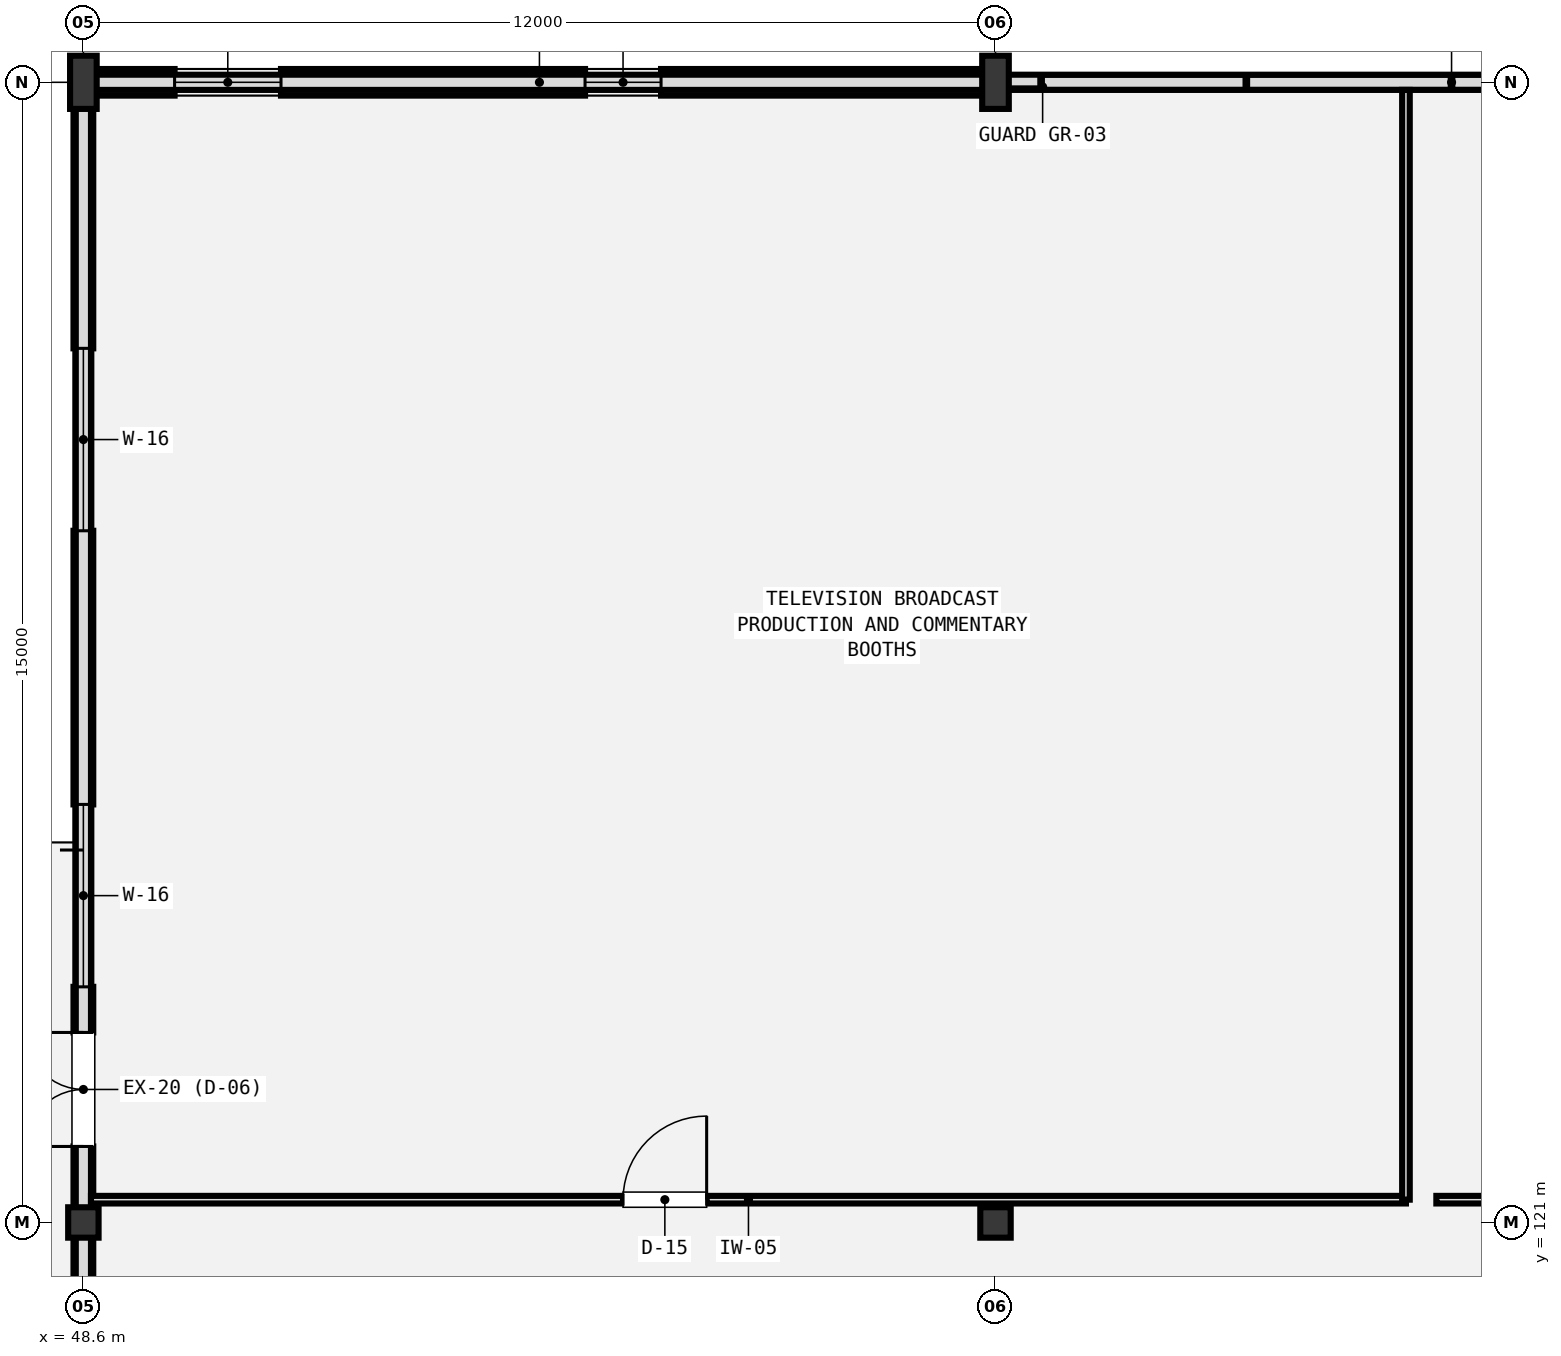
"""IFC4 building model, lengths in metres.
Left out: names, types, materials, properties, quantities, classifications, styles, units other than length and angle.
Written with IfcOpenShell. Run it as: python <this file> out.ifc"""

import sys

from ifc_helpers import new_model, si_unit, direction, frame, frame_2d, origin, origin_2d, place, context, subcontext, project, spatial, rectangle, extrude, element, fill, save


model = new_model("IFC4")
c1 = context("Model", 3, precision=1e-05, world=origin(), true_north=direction((0.0, 1.0)))
c2 = subcontext(c1, "Body", "Model", "MODEL_VIEW")
j1 = project(units=[si_unit("LENGTHUNIT", "METRE"), si_unit("PLANEANGLEUNIT", "RADIAN")], contexts=[c1])
p1 = place(None, origin())
s1 = spatial("IfcSite", under=j1, at=p1, CompositionType="ELEMENT")
p2 = place(p1, origin())
s2 = spatial("IfcBuilding", under=s1, at=p2, CompositionType="ELEMENT")
p3 = place(p2, frame((0.0, 0.0, 18.6)))
s3 = spatial("IfcBuildingStorey", under=s2, at=p3, CompositionType="ELEMENT", Elevation=18.6)
p4 = place(p3, frame((48.6, 121.0, 0.0), z_axis=(0.0, 0.0, 1.0), x_axis=(1.0, 0.0, 0.0)))
e1 = element("IfcColumn", 1, at=p4, inside=s3, PredefinedType="COLUMN", context=c2, shape_type="SweptSolid", body=[
    extrude(rectangle(XDim=0.4, YDim=0.4, at=origin_2d()), origin(), (0.0, 0.0, 1.0), 3.88),
])
p5 = place(p3, frame((48.6, 136.0, 0.0), z_axis=(0.0, 0.0, 1.0), x_axis=(1.0, 0.0, 0.0)))
e2 = element("IfcColumn", 2, at=p5, inside=s3, PredefinedType="COLUMN", context=c2, shape_type="SweptSolid", body=[
    extrude(rectangle(XDim=0.35, YDim=0.7, at=origin_2d()), origin(), (0.0, 0.0, 1.0), 3.88),
])
p6 = place(p3, frame((60.6, 121.0, 0.0), z_axis=(0.0, 0.0, 1.0), x_axis=(1.0, 0.0, 0.0)))
e3 = element("IfcColumn", 3, at=p6, inside=s3, PredefinedType="COLUMN", context=c2, shape_type="SweptSolid", body=[
    extrude(rectangle(XDim=0.4, YDim=0.4, at=origin_2d()), origin(), (0.0, 0.0, 1.0), 3.88),
])
p7 = place(p3, frame((60.6, 136.0, 0.0), z_axis=(0.0, 0.0, 1.0), x_axis=(1.0, 0.0, 0.0)))
e4 = element("IfcColumn", 4, at=p7, inside=s3, PredefinedType="COLUMN", context=c2, shape_type="SweptSolid", body=[
    extrude(rectangle(XDim=0.35, YDim=0.7, at=origin_2d()), origin(), (0.0, 0.0, 1.0), 3.88),
])
p8 = place(p3, frame((48.6, 136.0, 0.0), z_axis=(0.0, 0.0, 1.0), x_axis=(1.0, 0.0, 0.0)))
e5 = element("IfcWall", 5, at=p8, inside=s3, PredefinedType="SOLIDWALL", context=c2, shape_type="SweptSolid", body=[
    extrude(rectangle(XDim=12.0, YDim=0.35, at=frame_2d((6.0, 0.0))), origin(), (0.0, 0.0, 1.0), 3.43),
])
p9 = place(p8, frame((1.2, 0.0, 0.95)))
e6 = element("IfcOpeningElement", 6, at=p9, cuts=e5, PredefinedType="OPENING", context=c2, shape_type="SweptSolid", body=[
    extrude(rectangle(XDim=1.4, YDim=0.75, at=frame_2d((0.7, 0.375))), frame((0.0, 0.185, 0.0), z_axis=(0.0, -1.0, 0.0), x_axis=(1.0, 0.0, 0.0)), (0.0, 0.0, 1.0), 0.37),
])
p10 = place(p8, frame((6.6, 0.0, 0.95)))
e7 = element("IfcOpeningElement", 7, at=p10, cuts=e5, PredefinedType="OPENING", context=c2, shape_type="SweptSolid", body=[
    extrude(rectangle(XDim=1.0, YDim=0.75, at=frame_2d((0.5, 0.375))), frame((0.0, 0.185, 0.0), z_axis=(0.0, -1.0, 0.0), x_axis=(1.0, 0.0, 0.0)), (0.0, 0.0, 1.0), 0.37),
])
p11 = place(p3, frame((48.6, 108.6, 0.0), z_axis=(0.0, 0.0, 1.0), x_axis=(0.0, 1.0, 0.0)))
e8 = element("IfcWall", 8, at=p11, inside=s3, PredefinedType="SOLIDWALL", context=c2, shape_type="SweptSolid", body=[
    extrude(rectangle(XDim=27.4, YDim=0.26, at=frame_2d((13.7, 0.0))), origin(), (0.0, 0.0, 1.0), 3.43),
])
p12 = place(p11, frame((13.4, 0.0, 0.0)))
e9 = element("IfcOpeningElement", 9, at=p12, cuts=e8, PredefinedType="OPENING", context=c2, shape_type="SweptSolid", body=[
    extrude(rectangle(XDim=1.5, YDim=2.2, at=frame_2d((0.75, 1.1))), frame((0.0, 0.14, 0.0), z_axis=(0.0, -1.0, 0.0), x_axis=(1.0, 0.0, 0.0)), (0.0, 0.0, 1.0), 0.28),
])
p13 = place(p11, frame((15.5, 0.0, 0.85)))
e10 = element("IfcOpeningElement", 10, at=p13, cuts=e8, PredefinedType="OPENING", context=c2, shape_type="SweptSolid", body=[
    extrude(rectangle(XDim=2.4, YDim=1.5, at=frame_2d((1.2, 0.75))), frame((0.0, 0.14, 0.0), z_axis=(0.0, -1.0, 0.0), x_axis=(1.0, 0.0, 0.0)), (0.0, 0.0, 1.0), 0.28),
])
p14 = place(p11, frame((21.5, 0.0, 0.85)))
e11 = element("IfcOpeningElement", 11, at=p14, cuts=e8, PredefinedType="OPENING", context=c2, shape_type="SweptSolid", body=[
    extrude(rectangle(XDim=2.4, YDim=1.5, at=frame_2d((1.2, 0.75))), frame((0.0, 0.14, 0.0), z_axis=(0.0, -1.0, 0.0), x_axis=(1.0, 0.0, 0.0)), (0.0, 0.0, 1.0), 0.28),
])
p15 = place(p3, frame((48.6, 136.0, 4.2), z_axis=(0.0, 0.0, 1.0), x_axis=(1.0, 0.0, 0.0)))
e12 = element("IfcWall", 12, at=p15, inside=s3, PredefinedType="PARAPET", context=c2, shape_type="SweptSolid", body=[
    extrude(rectangle(XDim=48.0, YDim=0.2, at=frame_2d((24.0, 0.0))), origin(), (0.0, 0.0, 1.0), 1.15),
])
p16 = place(p3, frame((48.6, 108.6, 4.2), z_axis=(0.0, 0.0, 1.0), x_axis=(0.0, 1.0, 0.0)))
e13 = element("IfcWall", 13, at=p16, inside=s3, PredefinedType="PARAPET", context=c2, shape_type="SweptSolid", body=[
    extrude(rectangle(XDim=27.4, YDim=0.2, at=frame_2d((13.7, 0.0))), origin(), (0.0, 0.0, 1.0), 1.15),
])
p17 = place(p3, frame((48.7, 121.3, 0.0), z_axis=(0.0, 0.0, 1.0), x_axis=(1.0, 0.0, 0.0)))
e14 = element("IfcWall", 14, at=p17, inside=s3, PredefinedType="PARTITIONING", context=c2, shape_type="SweptSolid", body=[
    extrude(rectangle(XDim=17.3, YDim=0.1, at=frame_2d((8.65, 0.0))), origin(), (0.0, 0.0, 1.0), 3.25),
])
p18 = place(p17, frame((7.0, 0.0, 0.0)))
e15 = element("IfcOpeningElement", 15, at=p18, cuts=e14, PredefinedType="OPENING", context=c2, shape_type="SweptSolid", body=[
    extrude(rectangle(XDim=1.1, YDim=2.2, at=frame_2d((0.55, 1.1))), frame((0.0, 0.06, 0.0), z_axis=(0.0, -1.0, 0.0), x_axis=(1.0, 0.0, 0.0)), (0.0, 0.0, 1.0), 0.12),
])
p19 = place(p3, frame((66.0, 121.3, 0.0), z_axis=(0.0, 0.0, 1.0), x_axis=(0.0, 1.0, 0.0)))
e16 = element("IfcWall", 16, at=p19, inside=s3, PredefinedType="PARTITIONING", context=c2, shape_type="SweptSolid", body=[
    extrude(rectangle(XDim=14.6, YDim=0.1, at=frame_2d((7.3, 0.0))), origin(), (0.0, 0.0, 1.0), 3.25),
])
p20 = place(p3, frame((66.4, 121.3, 0.0), z_axis=(0.0, 0.0, 1.0), x_axis=(1.0, 0.0, 0.0)))
e17 = element("IfcWall", 17, at=p20, inside=s3, PredefinedType="PARTITIONING", context=c2, shape_type="SweptSolid", body=[
    extrude(rectangle(XDim=13.6, YDim=0.1, at=frame_2d((6.8, 0.0))), origin(), (0.0, 0.0, 1.0), 3.25),
])
p21 = place(p20, frame((2.8, 0.0, 0.0)))
e18 = element("IfcOpeningElement", 18, at=p21, cuts=e17, PredefinedType="OPENING", context=c2, shape_type="SweptSolid", body=[
    extrude(rectangle(XDim=1.1, YDim=2.2, at=frame_2d((0.55, 1.1))), frame((0.0, 0.06, 0.0), z_axis=(0.0, -1.0, 0.0), x_axis=(1.0, 0.0, 0.0)), (0.0, 0.0, 1.0), 0.12),
])
p22 = place(p9, origin())
e19 = element("IfcWindow", 19, at=p22, inside=s3, PartitioningType="SINGLE_PANEL", PredefinedType="WINDOW", context=c2, shape_type="SweptSolid", body=[
    extrude(rectangle(XDim=1.4, YDim=0.75, at=frame_2d((0.7, 0.375))), frame((0.0, 0.03, 0.0), z_axis=(0.0, -1.0, 0.0), x_axis=(1.0, 0.0, 0.0)), (0.0, 0.0, 1.0), 0.06),
])
fill(e6, e19)
p23 = place(p10, origin())
e20 = element("IfcWindow", 20, at=p23, inside=s3, PartitioningType="SINGLE_PANEL", PredefinedType="WINDOW", context=c2, shape_type="SweptSolid", body=[
    extrude(rectangle(XDim=1.0, YDim=0.75, at=frame_2d((0.5, 0.375))), frame((0.0, 0.03, 0.0), z_axis=(0.0, -1.0, 0.0), x_axis=(1.0, 0.0, 0.0)), (0.0, 0.0, 1.0), 0.06),
])
fill(e7, e20)
p24 = place(p12, origin())
e21 = element("IfcDoor", 21, at=p24, inside=s3, OperationType="DOUBLE_DOOR_SINGLE_SWING", PredefinedType="DOOR", context=c2, shape_type="SweptSolid", body=[
    extrude(rectangle(XDim=1.5, YDim=2.2, at=frame_2d((0.75, 1.1))), frame((0.0, 0.025, 0.0), z_axis=(0.0, -1.0, 0.0), x_axis=(1.0, 0.0, 0.0)), (0.0, 0.0, 1.0), 0.05),
])
fill(e9, e21)
p25 = place(p13, origin())
e22 = element("IfcWindow", 22, at=p25, inside=s3, PartitioningType="DOUBLE_PANEL_VERTICAL", PredefinedType="WINDOW", context=c2, shape_type="SweptSolid", body=[
    extrude(rectangle(XDim=2.4, YDim=1.5, at=frame_2d((1.2, 0.75))), frame((0.0, 0.03, 0.0), z_axis=(0.0, -1.0, 0.0), x_axis=(1.0, 0.0, 0.0)), (0.0, 0.0, 1.0), 0.06),
])
fill(e10, e22)
p26 = place(p14, origin())
e23 = element("IfcWindow", 23, at=p26, inside=s3, PartitioningType="DOUBLE_PANEL_VERTICAL", PredefinedType="WINDOW", context=c2, shape_type="SweptSolid", body=[
    extrude(rectangle(XDim=2.4, YDim=1.5, at=frame_2d((1.2, 0.75))), frame((0.0, 0.03, 0.0), z_axis=(0.0, -1.0, 0.0), x_axis=(1.0, 0.0, 0.0)), (0.0, 0.0, 1.0), 0.06),
])
fill(e11, e23)
p27 = place(p18, origin())
e24 = element("IfcDoor", 24, at=p27, inside=s3, OperationType="SINGLE_SWING_RIGHT", PredefinedType="DOOR", context=c2, shape_type="SweptSolid", body=[
    extrude(rectangle(XDim=1.1, YDim=2.2, at=frame_2d((0.55, 1.1))), frame((0.0, 0.025, 0.0), z_axis=(0.0, -1.0, 0.0), x_axis=(1.0, 0.0, 0.0)), (0.0, 0.0, 1.0), 0.05),
])
fill(e15, e24)
save(model, sys.argv[1])
